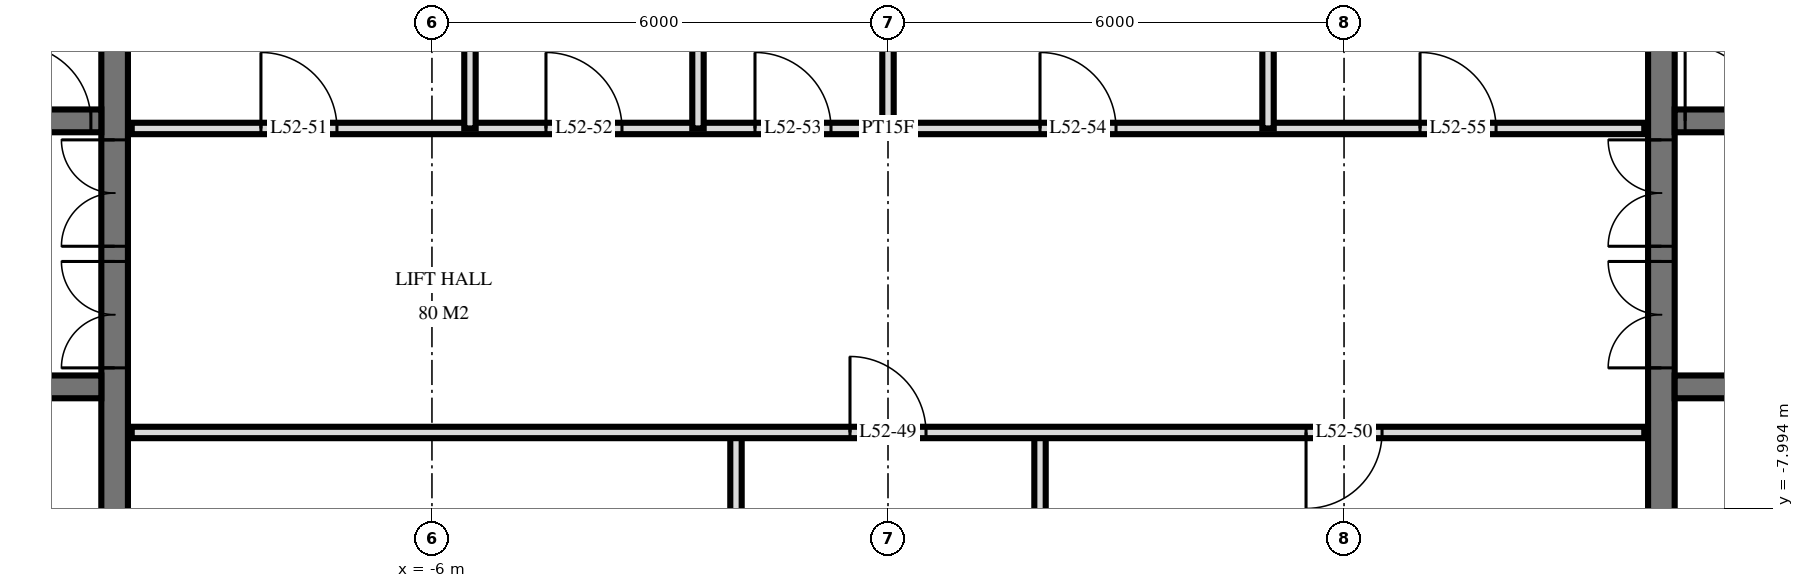
"""IFC4 building model, lengths in metres.
Left out: names, types, materials, properties, quantities, classifications, styles, units other than length and angle.
Written with IfcOpenShell. Run it as: python <this file> out.ifc"""

import sys

from ifc_helpers import new_model, si_unit, direction, frame, frame_2d, origin, place, context, subcontext, project, spatial, rectangle, extrude, element, fill, save


model = new_model("IFC4")
c1 = context("Model", 3, precision=1e-05, world=origin(), true_north=direction((0.0, 1.0)))
c2 = subcontext(c1, "Body", "Model", "MODEL_VIEW")
j1 = project(units=[si_unit("LENGTHUNIT", "METRE"), si_unit("PLANEANGLEUNIT", "RADIAN")], contexts=[c1])
p1 = place(None, origin())
s1 = spatial("IfcSite", under=j1, at=p1, CompositionType="ELEMENT")
p2 = place(p1, origin())
s2 = spatial("IfcBuilding", under=s1, at=p2, CompositionType="ELEMENT")
p3 = place(p2, frame((0.0, 0.0, 201.1)))
s3 = spatial("IfcBuildingStorey", under=s2, at=p3, CompositionType="ELEMENT", Elevation=201.1)
p4 = place(p3, frame((-10.175, -14.55, 0.0), z_axis=(0.0, 0.0, 1.0), x_axis=(0.0, 1.0, 0.0)))
e1 = element("IfcWall", 1, at=p4, inside=s3, PredefinedType="SHEAR", context=c2, shape_type="SweptSolid", body=[
    extrude(rectangle(XDim=14.1, YDim=0.35, at=frame_2d((7.05, 0.0))), origin(), (0.0, 0.0, 1.0), 3.5),
])
p5 = place(p4, frame((8.4, 0.0, 0.0)))
e2 = element("IfcOpeningElement", 2, at=p5, cuts=e1, PredefinedType="OPENING", context=c2, shape_type="SweptSolid", body=[
    extrude(rectangle(XDim=1.4, YDim=2.4, at=frame_2d((0.7, 1.2))), frame((0.0, 0.185, 0.0), z_axis=(0.0, -1.0, 0.0), x_axis=(1.0, 0.0, 0.0)), (0.0, 0.0, 1.0), 0.37),
])
p6 = place(p4, frame((10.0, 0.0, 0.0)))
e3 = element("IfcOpeningElement", 3, at=p6, cuts=e1, PredefinedType="OPENING", context=c2, shape_type="SweptSolid", body=[
    extrude(rectangle(XDim=1.4, YDim=2.4, at=frame_2d((0.7, 1.2))), frame((0.0, 0.185, 0.0), z_axis=(0.0, -1.0, 0.0), x_axis=(1.0, 0.0, 0.0)), (0.0, 0.0, 1.0), 0.37),
])
p7 = place(p4, frame((4.0, 0.0, 0.0)))
e4 = element("IfcOpeningElement", 4, at=p7, cuts=e1, PredefinedType="OPENING", context=c2, shape_type="SweptSolid", body=[
    extrude(rectangle(XDim=1.2, YDim=2.1, at=frame_2d((0.6, 1.05))), frame((0.0, 0.185, 0.0), z_axis=(0.0, -1.0, 0.0), x_axis=(1.0, 0.0, 0.0)), (0.0, 0.0, 1.0), 0.37),
])
p8 = place(p3, frame((-24.05, -2.9, 0.0), z_axis=(0.0, 0.0, 1.0), x_axis=(1.0, 0.0, 0.0)))
e5 = element("IfcWall", 5, at=p8, inside=s3, PredefinedType="SHEAR", context=c2, shape_type="SweptSolid", body=[
    extrude(rectangle(XDim=13.7, YDim=0.3, at=frame_2d((6.85, 0.0))), origin(), (0.0, 0.0, 1.0), 3.5),
])
p9 = place(p8, frame((0.55, 0.0, 0.0)))
e6 = element("IfcOpeningElement", 6, at=p9, cuts=e5, PredefinedType="OPENING", context=c2, shape_type="SweptSolid", body=[
    extrude(rectangle(XDim=1.1, YDim=2.1, at=frame_2d((0.55, 1.05))), frame((0.0, 0.16, 0.0), z_axis=(0.0, -1.0, 0.0), x_axis=(1.0, 0.0, 0.0)), (0.0, 0.0, 1.0), 0.32),
])
p10 = place(p8, frame((6.613, 0.0, 0.0)))
e7 = element("IfcOpeningElement", 7, at=p10, cuts=e5, PredefinedType="OPENING", context=c2, shape_type="SweptSolid", body=[
    extrude(rectangle(XDim=0.9, YDim=2.1, at=frame_2d((0.45, 1.05))), frame((0.0, 0.16, 0.0), z_axis=(0.0, -1.0, 0.0), x_axis=(1.0, 0.0, 0.0)), (0.0, 0.0, 1.0), 0.32),
])
p11 = place(p8, frame((5.188, 0.0, 0.0)))
e8 = element("IfcOpeningElement", 8, at=p11, cuts=e5, PredefinedType="OPENING", context=c2, shape_type="SweptSolid", body=[
    extrude(rectangle(XDim=0.9, YDim=2.1, at=frame_2d((0.45, 1.05))), frame((0.0, 0.16, 0.0), z_axis=(0.0, -1.0, 0.0), x_axis=(1.0, 0.0, 0.0)), (0.0, 0.0, 1.0), 0.32),
])
p12 = place(p8, frame((12.562, 0.0, 0.0)))
e9 = element("IfcOpeningElement", 9, at=p12, cuts=e5, PredefinedType="OPENING", context=c2, shape_type="SweptSolid", body=[
    extrude(rectangle(XDim=1.0, YDim=2.1, at=frame_2d((0.5, 1.05))), frame((0.0, 0.16, 0.0), z_axis=(0.0, -1.0, 0.0), x_axis=(1.0, 0.0, 0.0)), (0.0, 0.0, 1.0), 0.32),
])
p13 = place(p8, frame((11.137, 0.0, 0.0)))
e10 = element("IfcOpeningElement", 10, at=p13, cuts=e5, PredefinedType="OPENING", context=c2, shape_type="SweptSolid", body=[
    extrude(rectangle(XDim=1.0, YDim=2.1, at=frame_2d((0.5, 1.05))), frame((0.0, 0.16, 0.0), z_axis=(0.0, -1.0, 0.0), x_axis=(1.0, 0.0, 0.0)), (0.0, 0.0, 1.0), 0.32),
])
p14 = place(p8, frame((8.85, 0.0, 0.0)))
e11 = element("IfcOpeningElement", 11, at=p14, cuts=e5, PredefinedType="OPENING", context=c2, shape_type="SweptSolid", body=[
    extrude(rectangle(XDim=1.0, YDim=2.1, at=frame_2d((0.5, 1.05))), frame((0.0, 0.16, 0.0), z_axis=(0.0, -1.0, 0.0), x_axis=(1.0, 0.0, 0.0)), (0.0, 0.0, 1.0), 0.32),
])
p15 = place(p8, frame((3.0, 0.0, 0.0)))
e12 = element("IfcOpeningElement", 12, at=p15, cuts=e5, PredefinedType="OPENING", context=c2, shape_type="SweptSolid", body=[
    extrude(rectangle(XDim=1.0, YDim=2.1, at=frame_2d((0.5, 1.05))), frame((0.0, 0.16, 0.0), z_axis=(0.0, -1.0, 0.0), x_axis=(1.0, 0.0, 0.0)), (0.0, 0.0, 1.0), 0.32),
])
p16 = place(p3, frame((-24.05, -6.4, 0.0), z_axis=(0.0, 0.0, 1.0), x_axis=(1.0, 0.0, 0.0)))
e13 = element("IfcWall", 13, at=p16, inside=s3, PredefinedType="SHEAR", context=c2, shape_type="SweptSolid", body=[
    extrude(rectangle(XDim=13.7, YDim=0.3, at=frame_2d((6.85, 0.0))), origin(), (0.0, 0.0, 1.0), 3.5),
])
p17 = place(p16, frame((0.55, 0.0, 0.0)))
e14 = element("IfcOpeningElement", 14, at=p17, cuts=e13, PredefinedType="OPENING", context=c2, shape_type="SweptSolid", body=[
    extrude(rectangle(XDim=1.1, YDim=2.1, at=frame_2d((0.55, 1.05))), frame((0.0, 0.16, 0.0), z_axis=(0.0, -1.0, 0.0), x_axis=(1.0, 0.0, 0.0)), (0.0, 0.0, 1.0), 0.32),
])
p18 = place(p16, frame((5.8, 0.0, 0.0)))
e15 = element("IfcOpeningElement", 15, at=p18, cuts=e13, PredefinedType="OPENING", context=c2, shape_type="SweptSolid", body=[
    extrude(rectangle(XDim=1.1, YDim=2.1, at=frame_2d((0.55, 1.05))), frame((0.0, 0.16, 0.0), z_axis=(0.0, -1.0, 0.0), x_axis=(1.0, 0.0, 0.0)), (0.0, 0.0, 1.0), 0.32),
])
p19 = place(p3, frame((10.175, -14.55, 0.0), z_axis=(0.0, 0.0, 1.0), x_axis=(0.0, 1.0, 0.0)))
e16 = element("IfcWall", 16, at=p19, inside=s3, PredefinedType="SHEAR", context=c2, shape_type="SweptSolid", body=[
    extrude(rectangle(XDim=14.1, YDim=0.35, at=frame_2d((7.05, 0.0))), origin(), (0.0, 0.0, 1.0), 3.5),
])
p20 = place(p19, frame((8.4, 0.0, 0.0)))
e17 = element("IfcOpeningElement", 17, at=p20, cuts=e16, PredefinedType="OPENING", context=c2, shape_type="SweptSolid", body=[
    extrude(rectangle(XDim=1.4, YDim=2.4, at=frame_2d((0.7, 1.2))), frame((0.0, 0.185, 0.0), z_axis=(0.0, -1.0, 0.0), x_axis=(1.0, 0.0, 0.0)), (0.0, 0.0, 1.0), 0.37),
])
p21 = place(p19, frame((10.0, 0.0, 0.0)))
e18 = element("IfcOpeningElement", 18, at=p21, cuts=e16, PredefinedType="OPENING", context=c2, shape_type="SweptSolid", body=[
    extrude(rectangle(XDim=1.4, YDim=2.4, at=frame_2d((0.7, 1.2))), frame((0.0, 0.185, 0.0), z_axis=(0.0, -1.0, 0.0), x_axis=(1.0, 0.0, 0.0)), (0.0, 0.0, 1.0), 0.37),
])
p22 = place(p19, frame((4.0, 0.0, 0.0)))
e19 = element("IfcOpeningElement", 19, at=p22, cuts=e16, PredefinedType="OPENING", context=c2, shape_type="SweptSolid", body=[
    extrude(rectangle(XDim=1.2, YDim=2.1, at=frame_2d((0.6, 1.05))), frame((0.0, 0.185, 0.0), z_axis=(0.0, -1.0, 0.0), x_axis=(1.0, 0.0, 0.0)), (0.0, 0.0, 1.0), 0.37),
])
p23 = place(p3, frame((10.35, -2.9, 0.0), z_axis=(0.0, 0.0, 1.0), x_axis=(1.0, 0.0, 0.0)))
e20 = element("IfcWall", 20, at=p23, inside=s3, PredefinedType="SHEAR", context=c2, shape_type="SweptSolid", body=[
    extrude(rectangle(XDim=13.7, YDim=0.3, at=frame_2d((6.85, 0.0))), origin(), (0.0, 0.0, 1.0), 3.5),
])
p24 = place(p23, frame((12.05, 0.0, 0.0)))
e21 = element("IfcOpeningElement", 21, at=p24, cuts=e20, PredefinedType="OPENING", context=c2, shape_type="SweptSolid", body=[
    extrude(rectangle(XDim=1.1, YDim=2.1, at=frame_2d((0.55, 1.05))), frame((0.0, 0.16, 0.0), z_axis=(0.0, -1.0, 0.0), x_axis=(1.0, 0.0, 0.0)), (0.0, 0.0, 1.0), 0.32),
])
p25 = place(p23, frame((6.188, 0.0, 0.0)))
e22 = element("IfcOpeningElement", 22, at=p25, cuts=e20, PredefinedType="OPENING", context=c2, shape_type="SweptSolid", body=[
    extrude(rectangle(XDim=0.9, YDim=2.1, at=frame_2d((0.45, 1.05))), frame((0.0, 0.16, 0.0), z_axis=(0.0, -1.0, 0.0), x_axis=(1.0, 0.0, 0.0)), (0.0, 0.0, 1.0), 0.32),
])
p26 = place(p23, frame((7.613, 0.0, 0.0)))
e23 = element("IfcOpeningElement", 23, at=p26, cuts=e20, PredefinedType="OPENING", context=c2, shape_type="SweptSolid", body=[
    extrude(rectangle(XDim=0.9, YDim=2.1, at=frame_2d((0.45, 1.05))), frame((0.0, 0.16, 0.0), z_axis=(0.0, -1.0, 0.0), x_axis=(1.0, 0.0, 0.0)), (0.0, 0.0, 1.0), 0.32),
])
p27 = place(p23, frame((0.137, 0.0, 0.0)))
e24 = element("IfcOpeningElement", 24, at=p27, cuts=e20, PredefinedType="OPENING", context=c2, shape_type="SweptSolid", body=[
    extrude(rectangle(XDim=1.0, YDim=2.1, at=frame_2d((0.5, 1.05))), frame((0.0, 0.16, 0.0), z_axis=(0.0, -1.0, 0.0), x_axis=(1.0, 0.0, 0.0)), (0.0, 0.0, 1.0), 0.32),
])
p28 = place(p23, frame((1.562, 0.0, 0.0)))
e25 = element("IfcOpeningElement", 25, at=p28, cuts=e20, PredefinedType="OPENING", context=c2, shape_type="SweptSolid", body=[
    extrude(rectangle(XDim=1.0, YDim=2.1, at=frame_2d((0.5, 1.05))), frame((0.0, 0.16, 0.0), z_axis=(0.0, -1.0, 0.0), x_axis=(1.0, 0.0, 0.0)), (0.0, 0.0, 1.0), 0.32),
])
p29 = place(p23, frame((3.85, 0.0, 0.0)))
e26 = element("IfcOpeningElement", 26, at=p29, cuts=e20, PredefinedType="OPENING", context=c2, shape_type="SweptSolid", body=[
    extrude(rectangle(XDim=1.0, YDim=2.1, at=frame_2d((0.5, 1.05))), frame((0.0, 0.16, 0.0), z_axis=(0.0, -1.0, 0.0), x_axis=(1.0, 0.0, 0.0)), (0.0, 0.0, 1.0), 0.32),
])
p30 = place(p23, frame((9.7, 0.0, 0.0)))
e27 = element("IfcOpeningElement", 27, at=p30, cuts=e20, PredefinedType="OPENING", context=c2, shape_type="SweptSolid", body=[
    extrude(rectangle(XDim=1.0, YDim=2.1, at=frame_2d((0.5, 1.05))), frame((0.0, 0.16, 0.0), z_axis=(0.0, -1.0, 0.0), x_axis=(1.0, 0.0, 0.0)), (0.0, 0.0, 1.0), 0.32),
])
p31 = place(p3, frame((10.35, -6.4, 0.0), z_axis=(0.0, 0.0, 1.0), x_axis=(1.0, 0.0, 0.0)))
e28 = element("IfcWall", 28, at=p31, inside=s3, PredefinedType="SHEAR", context=c2, shape_type="SweptSolid", body=[
    extrude(rectangle(XDim=13.7, YDim=0.3, at=frame_2d((6.85, 0.0))), origin(), (0.0, 0.0, 1.0), 3.5),
])
p32 = place(p31, frame((12.05, 0.0, 0.0)))
e29 = element("IfcOpeningElement", 29, at=p32, cuts=e28, PredefinedType="OPENING", context=c2, shape_type="SweptSolid", body=[
    extrude(rectangle(XDim=1.1, YDim=2.1, at=frame_2d((0.55, 1.05))), frame((0.0, 0.16, 0.0), z_axis=(0.0, -1.0, 0.0), x_axis=(1.0, 0.0, 0.0)), (0.0, 0.0, 1.0), 0.32),
])
p33 = place(p31, frame((6.8, 0.0, 0.0)))
e30 = element("IfcOpeningElement", 30, at=p33, cuts=e28, PredefinedType="OPENING", context=c2, shape_type="SweptSolid", body=[
    extrude(rectangle(XDim=1.1, YDim=2.1, at=frame_2d((0.55, 1.05))), frame((0.0, 0.16, 0.0), z_axis=(0.0, -1.0, 0.0), x_axis=(1.0, 0.0, 0.0)), (0.0, 0.0, 1.0), 0.32),
])
p34 = place(p3, frame((5.0, -3.0, 0.0), z_axis=(0.0, 0.0, 1.0), x_axis=(0.0, 1.0, 0.0)))
e31 = element("IfcWall", 31, at=p34, inside=s3, PredefinedType="PARTITIONING", context=c2, shape_type="SweptSolid", body=[
    extrude(rectangle(XDim=4.02, YDim=0.15, at=frame_2d((2.01, 0.0))), origin(), (0.0, 0.0, 1.0), 3.22),
])
p35 = place(p3, frame((2.0, -11.0, 0.0), z_axis=(0.0, 0.0, 1.0), x_axis=(0.0, 1.0, 0.0)))
e32 = element("IfcWall", 32, at=p35, inside=s3, PredefinedType="PARTITIONING", context=c2, shape_type="SweptSolid", body=[
    extrude(rectangle(XDim=4.0, YDim=0.15, at=frame_2d((2.0, 0.0))), origin(), (0.0, 0.0, 1.0), 3.22),
])
p36 = place(p3, frame((0.0, -3.0, 0.0), z_axis=(0.0, 0.0, 1.0), x_axis=(0.0, 1.0, 0.0)))
e33 = element("IfcWall", 33, at=p36, inside=s3, PredefinedType="PLUMBINGWALL", context=c2, shape_type="SweptSolid", body=[
    extrude(rectangle(XDim=4.02, YDim=0.15, at=frame_2d((2.01, 0.0))), origin(), (0.0, 0.0, 1.0), 3.22),
])
p37 = place(p3, frame((-2.0, -11.0, 0.0), z_axis=(0.0, 0.0, 1.0), x_axis=(0.0, 1.0, 0.0)))
e34 = element("IfcWall", 34, at=p37, inside=s3, PredefinedType="PARTITIONING", context=c2, shape_type="SweptSolid", body=[
    extrude(rectangle(XDim=4.0, YDim=0.15, at=frame_2d((2.0, 0.0))), origin(), (0.0, 0.0, 1.0), 3.22),
])
for number, where, z_axis, x_axis in (
    (35, (-2.5, -3.0, 0.0), (0.0, 0.0, 1.0), (0.0, 1.0, 0.0)),
    (36, (-5.5, -3.0, 0.0), (0.0, 0.0, 1.0), (0.0, 1.0, 0.0)),
):
    element("IfcWall", number, at=place(p3, frame(where, z_axis=z_axis, x_axis=x_axis)), inside=s3, PredefinedType="PLUMBINGWALL", context=c2, shape_type="SweptSolid", body=[
        extrude(rectangle(XDim=4.02, YDim=0.15, at=frame_2d((2.01, 0.0))), origin(), (0.0, 0.0, 1.0), 3.22),
    ])
p38 = place(p3, frame((-9.95, -7.0, 0.0), z_axis=(0.0, 0.0, 1.0), x_axis=(1.0, 0.0, 0.0)))
e37 = element("IfcWall", 37, at=p38, inside=s3, PredefinedType="PARTITIONING", context=c2, shape_type="SweptSolid", body=[
    extrude(rectangle(XDim=19.9, YDim=0.15, at=frame_2d((9.95, 0.0))), origin(), (0.0, 0.0, 1.0), 3.22),
])
p39 = place(p38, frame((9.45, 0.0, 0.0)))
e38 = element("IfcOpeningElement", 38, at=p39, cuts=e37, PredefinedType="OPENING", context=c2, shape_type="SweptSolid", body=[
    extrude(rectangle(XDim=1.0, YDim=2.1, at=frame_2d((0.5, 1.05))), frame((0.0, 0.085, 0.0), z_axis=(0.0, -1.0, 0.0), x_axis=(1.0, 0.0, 0.0)), (0.0, 0.0, 1.0), 0.17),
])
p40 = place(p38, frame((15.45, 0.0, 0.0)))
e39 = element("IfcOpeningElement", 39, at=p40, cuts=e37, PredefinedType="OPENING", context=c2, shape_type="SweptSolid", body=[
    extrude(rectangle(XDim=1.0, YDim=2.1, at=frame_2d((0.5, 1.05))), frame((0.0, 0.085, 0.0), z_axis=(0.0, -1.0, 0.0), x_axis=(1.0, 0.0, 0.0)), (0.0, 0.0, 1.0), 0.17),
])
p41 = place(p3, frame((-9.95, -3.0, 0.0), z_axis=(0.0, 0.0, 1.0), x_axis=(1.0, 0.0, 0.0)))
e40 = element("IfcWall", 40, at=p41, inside=s3, PredefinedType="PARTITIONING", context=c2, shape_type="SweptSolid", body=[
    extrude(rectangle(XDim=19.9, YDim=0.15, at=frame_2d((9.95, 0.0))), origin(), (0.0, 0.0, 1.0), 3.22),
])
p42 = place(p41, frame((1.7, 0.0, 0.0)))
e41 = element("IfcOpeningElement", 41, at=p42, cuts=e40, PredefinedType="OPENING", context=c2, shape_type="SweptSolid", body=[
    extrude(rectangle(XDim=1.0, YDim=2.1, at=frame_2d((0.5, 1.05))), frame((0.0, 0.085, 0.0), z_axis=(0.0, -1.0, 0.0), x_axis=(1.0, 0.0, 0.0)), (0.0, 0.0, 1.0), 0.17),
])
p43 = place(p41, frame((5.45, 0.0, 0.0)))
e42 = element("IfcOpeningElement", 42, at=p43, cuts=e40, PredefinedType="OPENING", context=c2, shape_type="SweptSolid", body=[
    extrude(rectangle(XDim=1.0, YDim=2.1, at=frame_2d((0.5, 1.05))), frame((0.0, 0.085, 0.0), z_axis=(0.0, -1.0, 0.0), x_axis=(1.0, 0.0, 0.0)), (0.0, 0.0, 1.0), 0.17),
])
p44 = place(p41, frame((8.2, 0.0, 0.0)))
e43 = element("IfcOpeningElement", 43, at=p44, cuts=e40, PredefinedType="OPENING", context=c2, shape_type="SweptSolid", body=[
    extrude(rectangle(XDim=1.0, YDim=2.1, at=frame_2d((0.5, 1.05))), frame((0.0, 0.085, 0.0), z_axis=(0.0, -1.0, 0.0), x_axis=(1.0, 0.0, 0.0)), (0.0, 0.0, 1.0), 0.17),
])
p45 = place(p41, frame((11.95, 0.0, 0.0)))
e44 = element("IfcOpeningElement", 44, at=p45, cuts=e40, PredefinedType="OPENING", context=c2, shape_type="SweptSolid", body=[
    extrude(rectangle(XDim=1.0, YDim=2.1, at=frame_2d((0.5, 1.05))), frame((0.0, 0.085, 0.0), z_axis=(0.0, -1.0, 0.0), x_axis=(1.0, 0.0, 0.0)), (0.0, 0.0, 1.0), 0.17),
])
p46 = place(p41, frame((16.95, 0.0, 0.0)))
e45 = element("IfcOpeningElement", 45, at=p46, cuts=e40, PredefinedType="OPENING", context=c2, shape_type="SweptSolid", body=[
    extrude(rectangle(XDim=1.0, YDim=2.1, at=frame_2d((0.5, 1.05))), frame((0.0, 0.085, 0.0), z_axis=(0.0, -1.0, 0.0), x_axis=(1.0, 0.0, 0.0)), (0.0, 0.0, 1.0), 0.17),
])
p47 = place(p5, origin())
e46 = element("IfcDoor", 46, at=p47, inside=s3, OperationType="DOUBLE_DOOR_SINGLE_SWING", PredefinedType="DOOR", context=c2, shape_type="SweptSolid", body=[
    extrude(rectangle(XDim=1.4, YDim=2.4, at=frame_2d((0.7, 1.2))), frame((0.0, 0.025, 0.0), z_axis=(0.0, -1.0, 0.0), x_axis=(1.0, 0.0, 0.0)), (0.0, 0.0, 1.0), 0.05),
])
fill(e2, e46)
p48 = place(p6, origin())
e47 = element("IfcDoor", 47, at=p48, inside=s3, OperationType="DOUBLE_DOOR_SINGLE_SWING", PredefinedType="DOOR", context=c2, shape_type="SweptSolid", body=[
    extrude(rectangle(XDim=1.4, YDim=2.4, at=frame_2d((0.7, 1.2))), frame((0.0, 0.025, 0.0), z_axis=(0.0, -1.0, 0.0), x_axis=(1.0, 0.0, 0.0)), (0.0, 0.0, 1.0), 0.05),
])
fill(e3, e47)
p49 = place(p12, origin())
e48 = element("IfcDoor", 48, at=p49, inside=s3, OperationType="SINGLE_SWING_RIGHT", PredefinedType="DOOR", context=c2, shape_type="SweptSolid", body=[
    extrude(rectangle(XDim=1.0, YDim=2.1, at=frame_2d((0.5, 1.05))), frame((0.0, 0.025, 0.0), z_axis=(0.0, -1.0, 0.0), x_axis=(1.0, 0.0, 0.0)), (0.0, 0.0, 1.0), 0.05),
])
fill(e9, e48)
p50 = place(p20, origin())
e49 = element("IfcDoor", 49, at=p50, inside=s3, OperationType="DOUBLE_DOOR_SINGLE_SWING", PredefinedType="DOOR", context=c2, shape_type="SweptSolid", body=[
    extrude(rectangle(XDim=1.4, YDim=2.4, at=frame_2d((0.7, 1.2))), frame((0.0, 0.025, 0.0), z_axis=(0.0, -1.0, 0.0), x_axis=(1.0, 0.0, 0.0)), (0.0, 0.0, 1.0), 0.05),
])
fill(e17, e49)
p51 = place(p21, origin())
e50 = element("IfcDoor", 50, at=p51, inside=s3, OperationType="DOUBLE_DOOR_SINGLE_SWING", PredefinedType="DOOR", context=c2, shape_type="SweptSolid", body=[
    extrude(rectangle(XDim=1.4, YDim=2.4, at=frame_2d((0.7, 1.2))), frame((0.0, 0.025, 0.0), z_axis=(0.0, -1.0, 0.0), x_axis=(1.0, 0.0, 0.0)), (0.0, 0.0, 1.0), 0.05),
])
fill(e18, e50)
p52 = place(p27, origin())
e51 = element("IfcDoor", 51, at=p52, inside=s3, OperationType="SINGLE_SWING_RIGHT", PredefinedType="DOOR", context=c2, shape_type="SweptSolid", body=[
    extrude(rectangle(XDim=1.0, YDim=2.1, at=frame_2d((0.5, 1.05))), frame((0.0, 0.025, 0.0), z_axis=(0.0, -1.0, 0.0), x_axis=(1.0, 0.0, 0.0)), (0.0, 0.0, 1.0), 0.05),
])
fill(e24, e51)
p53 = place(p39, origin())
e52 = element("IfcDoor", 52, at=p53, inside=s3, OperationType="SINGLE_SWING_RIGHT", PredefinedType="DOOR", context=c2, shape_type="SweptSolid", body=[
    extrude(rectangle(XDim=1.0, YDim=2.1, at=frame_2d((0.5, 1.05))), frame((0.0, 0.025, 0.0), z_axis=(0.0, -1.0, 0.0), x_axis=(1.0, 0.0, 0.0)), (0.0, 0.0, 1.0), 0.05),
])
fill(e38, e52)
p54 = place(p40, frame((0.5, 0.0, 0.0), z_axis=(0.0, 0.0, 1.0), x_axis=(-1.0, 0.0, 0.0)))
e53 = element("IfcDoor", 53, at=p54, inside=s3, OperationType="SINGLE_SWING_LEFT", PredefinedType="DOOR", context=c2, shape_type="SweptSolid", body=[
    extrude(rectangle(XDim=1.0, YDim=2.1, at=frame_2d((0.0, 1.05))), frame((0.0, -0.025, 0.0), z_axis=(0.0, 1.0, 0.0), x_axis=(-1.0, 0.0, 0.0)), (0.0, 0.0, 1.0), 0.05),
])
fill(e39, e53)
p55 = place(p42, origin())
e54 = element("IfcDoor", 54, at=p55, inside=s3, OperationType="SINGLE_SWING_RIGHT", PredefinedType="DOOR", context=c2, shape_type="SweptSolid", body=[
    extrude(rectangle(XDim=1.0, YDim=2.1, at=frame_2d((0.5, 1.05))), frame((0.0, 0.025, 0.0), z_axis=(0.0, -1.0, 0.0), x_axis=(1.0, 0.0, 0.0)), (0.0, 0.0, 1.0), 0.05),
])
fill(e41, e54)
p56 = place(p43, origin())
e55 = element("IfcDoor", 55, at=p56, inside=s3, OperationType="SINGLE_SWING_RIGHT", PredefinedType="DOOR", context=c2, shape_type="SweptSolid", body=[
    extrude(rectangle(XDim=1.0, YDim=2.1, at=frame_2d((0.5, 1.05))), frame((0.0, 0.025, 0.0), z_axis=(0.0, -1.0, 0.0), x_axis=(1.0, 0.0, 0.0)), (0.0, 0.0, 1.0), 0.05),
])
fill(e42, e55)
p57 = place(p44, origin())
e56 = element("IfcDoor", 56, at=p57, inside=s3, OperationType="SINGLE_SWING_RIGHT", PredefinedType="DOOR", context=c2, shape_type="SweptSolid", body=[
    extrude(rectangle(XDim=1.0, YDim=2.1, at=frame_2d((0.5, 1.05))), frame((0.0, 0.025, 0.0), z_axis=(0.0, -1.0, 0.0), x_axis=(1.0, 0.0, 0.0)), (0.0, 0.0, 1.0), 0.05),
])
fill(e43, e56)
p58 = place(p45, origin())
e57 = element("IfcDoor", 57, at=p58, inside=s3, OperationType="SINGLE_SWING_RIGHT", PredefinedType="DOOR", context=c2, shape_type="SweptSolid", body=[
    extrude(rectangle(XDim=1.0, YDim=2.1, at=frame_2d((0.5, 1.05))), frame((0.0, 0.025, 0.0), z_axis=(0.0, -1.0, 0.0), x_axis=(1.0, 0.0, 0.0)), (0.0, 0.0, 1.0), 0.05),
])
fill(e44, e57)
p59 = place(p46, origin())
e58 = element("IfcDoor", 58, at=p59, inside=s3, OperationType="SINGLE_SWING_RIGHT", PredefinedType="DOOR", context=c2, shape_type="SweptSolid", body=[
    extrude(rectangle(XDim=1.0, YDim=2.1, at=frame_2d((0.5, 1.05))), frame((0.0, 0.025, 0.0), z_axis=(0.0, -1.0, 0.0), x_axis=(1.0, 0.0, 0.0)), (0.0, 0.0, 1.0), 0.05),
])
fill(e45, e58)
save(model, sys.argv[1])
